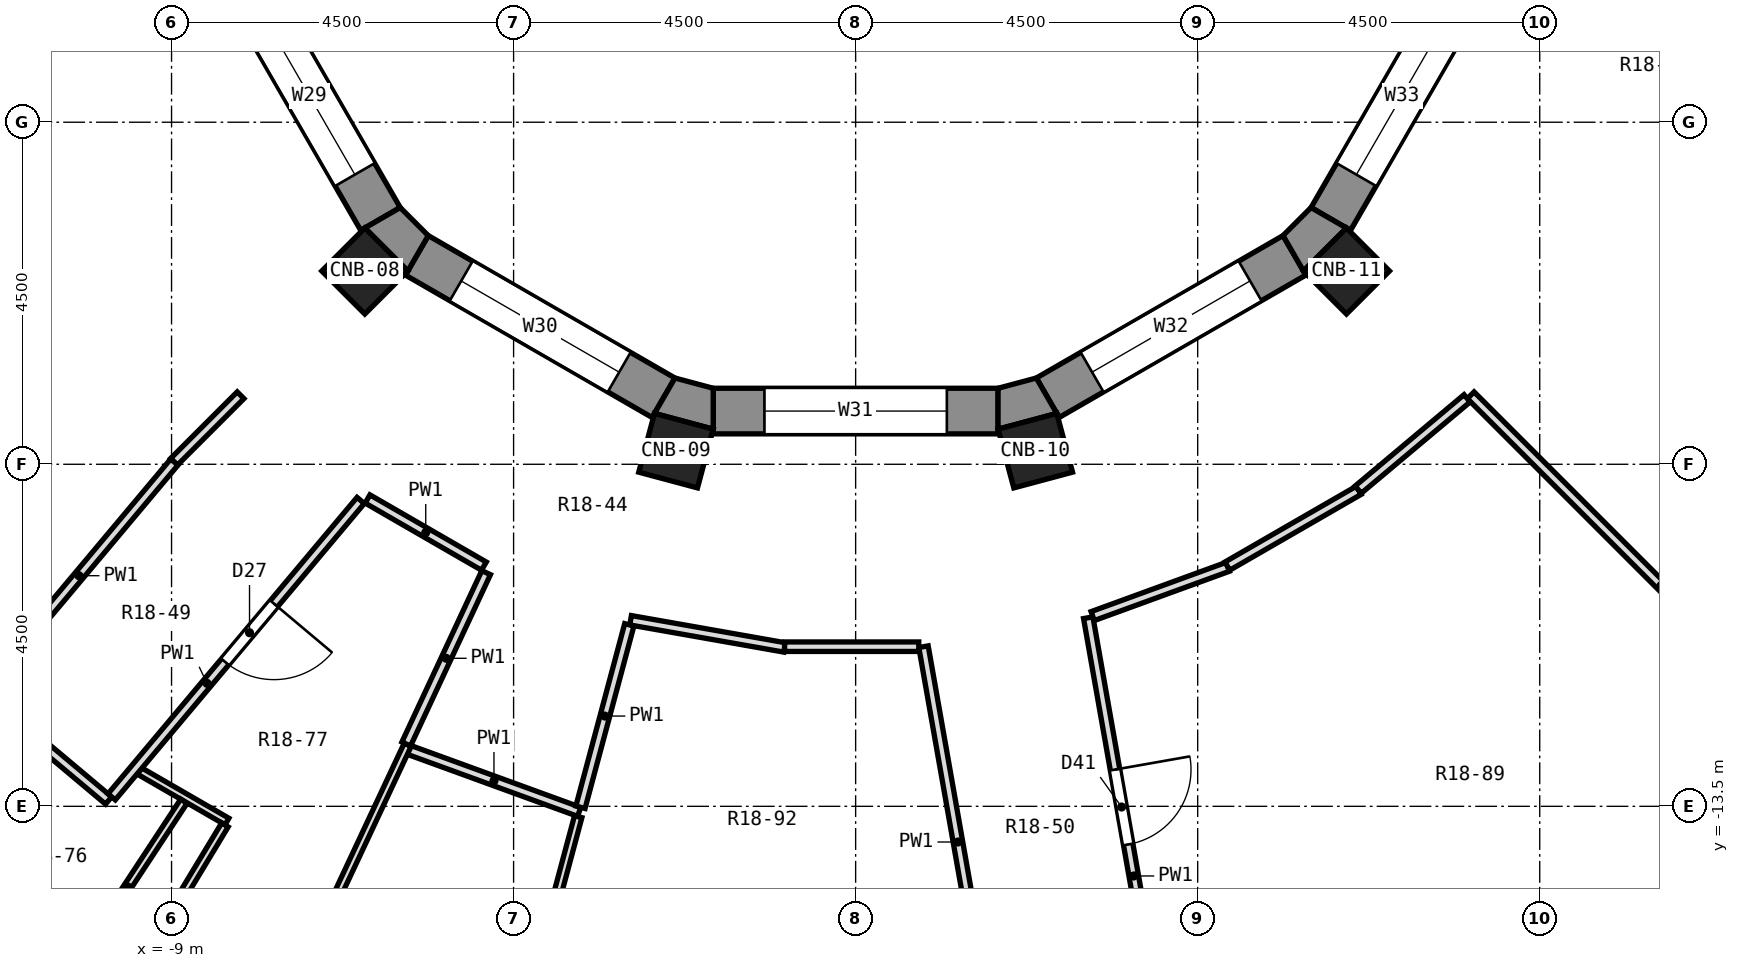
"""IFC4 building model, lengths in metres.
Left out: names, types, materials, properties, quantities, classifications, styles, units other than length and angle.
Written with IfcOpenShell. Run it as: python <this file> out.ifc"""

import sys

from ifc_helpers import new_model, si_unit, direction, frame, frame_2d, origin, origin_2d, place, context, subcontext, project, spatial, polyline, rectangle, outline, extrude, element, fill, save


model = new_model("IFC4")
c1 = context("Model", 3, precision=1e-05, world=origin(), true_north=direction((0.0, 1.0)))
c2 = subcontext(c1, "Body", "Model", "MODEL_VIEW")
j1 = project(units=[si_unit("LENGTHUNIT", "METRE"), si_unit("PLANEANGLEUNIT", "RADIAN")], contexts=[c1])
p1 = place(None, origin())
s1 = spatial("IfcSite", under=j1, at=p1, CompositionType="ELEMENT")
p2 = place(p1, origin())
s2 = spatial("IfcBuilding", under=s1, at=p2, CompositionType="ELEMENT")
p3 = place(p2, frame((0.0, 0.0, 101.8)))
s3 = spatial("IfcBuildingStorey", under=s2, at=p3, CompositionType="ELEMENT", Elevation=101.8)
for number, where, z_axis, x_axis in (
    (1, (-6.458, -6.458, 0.0), (0.0, 0.0, 1.0), (-0.707, -0.707, 0.0)),
    (2, (-2.364, -8.821, 0.0), (0.0, 0.0, 1.0), (-0.259, -0.966, 0.0)),
    (3, (2.364, -8.821, 0.0), (0.0, 0.0, 1.0), (0.259, -0.966, 0.0)),
    (4, (6.458, -6.458, 0.0), (0.0, 0.0, 1.0), (0.707, -0.707, 0.0)),
):
    element("IfcColumn", number, at=place(p3, frame(where, z_axis=z_axis, x_axis=x_axis)), inside=s3, PredefinedType="COLUMN", context=c2, shape_type="SweptSolid", body=[
        extrude(rectangle(XDim=0.8, YDim=0.8, at=origin_2d()), origin(), (0.0, 0.0, 1.0), 3.3),
    ])
p4 = place(p3, frame((-8.125, -2.527, 0.0), z_axis=(0.0, 0.0, 1.0), x_axis=(0.499964958637, -0.86604563398, 0.0)))
e5 = element("IfcWall", 5, at=p4, inside=s3, PredefinedType="SOLIDWALL", context=c2, shape_type="SweptSolid", body=[
    extrude(rectangle(XDim=3.747, YDim=0.6, at=frame_2d((1.874, 0.0))), origin(), (0.0, 0.0, 1.0), 2.8),
])
p5 = place(p4, frame((0.674, 0.0, 0.9)))
e6 = element("IfcOpeningElement", 6, at=p5, cuts=e5, PredefinedType="OPENING", context=c2, shape_type="SweptSolid", body=[
    extrude(rectangle(XDim=2.4, YDim=1.8, at=frame_2d((1.2, 0.9))), frame((0.0, 0.312, 0.0), z_axis=(0.0, -1.0, 0.0), x_axis=(1.0, 0.0, 0.0)), (0.0, 0.0, 1.0), 0.624),
])
p6 = place(p3, frame((-5.773, -6.251, 0.0), z_axis=(0.0, 0.0, 1.0), x_axis=(0.86604563398, -0.499964958637, 0.0)))
e7 = element("IfcWall", 7, at=p6, inside=s3, PredefinedType="SOLIDWALL", context=c2, shape_type="SweptSolid", body=[
    extrude(rectangle(XDim=3.747, YDim=0.6, at=frame_2d((1.874, 0.0))), origin(), (0.0, 0.0, 1.0), 2.8),
])
p7 = place(p6, frame((0.674, 0.0, 0.9)))
e8 = element("IfcOpeningElement", 8, at=p7, cuts=e7, PredefinedType="OPENING", context=c2, shape_type="SweptSolid", body=[
    extrude(rectangle(XDim=2.4, YDim=1.8, at=frame_2d((1.2, 0.9))), frame((0.0, 0.312, 0.0), z_axis=(0.0, -1.0, 0.0), x_axis=(1.0, 0.0, 0.0)), (0.0, 0.0, 1.0), 0.624),
])
p8 = place(p3, frame((-1.874, -8.3, 0.0), z_axis=(0.0, 0.0, 1.0), x_axis=(1.0, 0.0, 0.0)))
e9 = element("IfcWall", 9, at=p8, inside=s3, PredefinedType="SOLIDWALL", context=c2, shape_type="SweptSolid", body=[
    extrude(rectangle(XDim=3.748, YDim=0.6, at=frame_2d((1.874, 0.0))), origin(), (0.0, 0.0, 1.0), 2.8),
])
p9 = place(p8, frame((0.674, 0.0, 0.9)))
e10 = element("IfcOpeningElement", 10, at=p9, cuts=e9, PredefinedType="OPENING", context=c2, shape_type="SweptSolid", body=[
    extrude(rectangle(XDim=2.4, YDim=1.8, at=frame_2d((1.2, 0.9))), frame((0.0, 0.312, 0.0), z_axis=(0.0, -1.0, 0.0), x_axis=(1.0, 0.0, 0.0)), (0.0, 0.0, 1.0), 0.624),
])
p10 = place(p3, frame((2.527, -8.125, 0.0), z_axis=(0.0, 0.0, 1.0), x_axis=(0.86604563398, 0.499964958637, 0.0)))
e11 = element("IfcWall", 11, at=p10, inside=s3, PredefinedType="SOLIDWALL", context=c2, shape_type="SweptSolid", body=[
    extrude(rectangle(XDim=3.747, YDim=0.6, at=frame_2d((1.874, 0.0))), origin(), (0.0, 0.0, 1.0), 2.8),
])
p11 = place(p10, frame((0.674, 0.0, 0.9)))
e12 = element("IfcOpeningElement", 12, at=p11, cuts=e11, PredefinedType="OPENING", context=c2, shape_type="SweptSolid", body=[
    extrude(rectangle(XDim=2.4, YDim=1.8, at=frame_2d((1.2, 0.9))), frame((0.0, 0.312, 0.0), z_axis=(0.0, -1.0, 0.0), x_axis=(1.0, 0.0, 0.0)), (0.0, 0.0, 1.0), 0.624),
])
p12 = place(p3, frame((6.251, -5.773, 0.0), z_axis=(0.0, 0.0, 1.0), x_axis=(0.499964958637, 0.86604563398, 0.0)))
e13 = element("IfcWall", 13, at=p12, inside=s3, PredefinedType="SOLIDWALL", context=c2, shape_type="SweptSolid", body=[
    extrude(rectangle(XDim=3.747, YDim=0.6, at=frame_2d((1.874, 0.0))), origin(), (0.0, 0.0, 1.0), 2.8),
])
p13 = place(p12, frame((0.674, 0.0, 0.9)))
e14 = element("IfcOpeningElement", 14, at=p13, cuts=e13, PredefinedType="OPENING", context=c2, shape_type="SweptSolid", body=[
    extrude(rectangle(XDim=2.4, YDim=1.8, at=frame_2d((1.2, 0.9))), frame((0.0, 0.312, 0.0), z_axis=(0.0, -1.0, 0.0), x_axis=(1.0, 0.0, 0.0)), (0.0, 0.0, 1.0), 0.624),
])
p14 = place(p3, origin())
e15 = element("IfcWall", 15, at=p14, inside=s3, PredefinedType="SOLIDWALL", context=c2, shape_type="SweptSolid", body=[
    extrude(outline(polyline([(-6.458, -5.892), (-5.892, -6.458), (-5.623, -5.991), (-5.991, -5.623), (-6.458, -5.892)])), origin(), (0.0, 0.0, 1.0), 2.8),
])
p15 = place(p3, origin())
e16 = element("IfcWall", 16, at=p15, inside=s3, PredefinedType="SOLIDWALL", context=c2, shape_type="SweptSolid", body=[
    extrude(outline(polyline([(-1.874, -8.538), (-1.874, -8.0), (-2.377, -7.865), (-2.646, -8.331), (-1.874, -8.538)])), origin(), (0.0, 0.0, 1.0), 2.8),
])
p16 = place(p3, origin())
e17 = element("IfcWall", 17, at=p16, inside=s3, PredefinedType="SOLIDWALL", context=c2, shape_type="SweptSolid", body=[
    extrude(outline(polyline([(2.646, -8.331), (2.377, -7.865), (1.874, -8.0), (1.874, -8.538), (2.646, -8.331)])), origin(), (0.0, 0.0, 1.0), 2.8),
])
p17 = place(p3, origin())
e18 = element("IfcWall", 18, at=p17, inside=s3, PredefinedType="SOLIDWALL", context=c2, shape_type="SweptSolid", body=[
    extrude(outline(polyline([(5.892, -6.458), (6.458, -5.892), (5.991, -5.623), (5.623, -5.991), (5.892, -6.458)])), origin(), (0.0, 0.0, 1.0), 2.8),
])
p18 = place(p3, frame((0.893, -11.4, 0.0), z_axis=(0.0, 0.0, 1.0), x_axis=(0.173617189854, -0.984813216497, 0.0)))
e19 = element("IfcWall", 19, at=p18, inside=s3, PredefinedType="PARTITIONING", context=c2, shape_type="SweptSolid", body=[
    extrude(rectangle(XDim=5.219, YDim=0.125, at=frame_2d((2.609, 0.0))), origin(), (0.0, 0.0, 1.0), 2.8),
])
p19 = place(p3, frame((3.06, -11.019, 0.0), z_axis=(0.0, 0.0, 1.0), x_axis=(0.173641190819, -0.984808984956, 0.0)))
e20 = element("IfcWall", 20, at=p19, inside=s3, PredefinedType="PARTITIONING", context=c2, shape_type="SweptSolid", body=[
    extrude(rectangle(XDim=5.218, YDim=0.125, at=frame_2d((2.609, 0.0))), origin(), (0.0, 0.0, 1.0), 2.8),
])
p20 = place(p19, frame((2.029, 0.0, 0.0)))
e21 = element("IfcOpeningElement", 21, at=p20, cuts=e20, PredefinedType="OPENING", context=c2, shape_type="SweptSolid", body=[
    extrude(rectangle(XDim=1.0, YDim=2.1, at=frame_2d((0.5, 1.05))), frame((0.0, 0.074, 0.0), z_axis=(0.0, -1.0, 0.0), x_axis=(1.0, 0.0, 0.0)), (0.0, 0.0, 1.0), 0.149),
])
p21 = place(p3, frame((8.092, -8.092, 0.0), z_axis=(0.0, 0.0, 1.0), x_axis=(0.707106781187, -0.707106781187, 0.0)))
e22 = element("IfcWall", 22, at=p21, inside=s3, PredefinedType="PARTITIONING", context=c2, shape_type="SweptSolid", body=[
    extrude(rectangle(XDim=7.083, YDim=0.125, at=frame_2d((3.541, 0.0))), origin(), (0.0, 0.0, 1.0), 2.8),
])
p22 = place(p3, frame((-12.018, -14.327, 0.0), z_axis=(0.0, 0.0, 1.0), x_axis=(0.76605991383, -0.642769171961, 0.0)))
e23 = element("IfcWall", 23, at=p22, inside=s3, PredefinedType="PARTITIONING", context=c2, shape_type="SweptSolid", body=[
    extrude(rectangle(XDim=2.18, YDim=0.1, at=frame_2d((1.09, 0.0))), origin(), (0.0, 0.0, 1.0), 2.8),
])
p23 = place(p22, frame((0.689, 0.0, 0.0)))
e24 = element("IfcOpeningElement", 24, at=p23, cuts=e23, PredefinedType="OPENING", context=c2, shape_type="SweptSolid", body=[
    extrude(rectangle(XDim=0.8, YDim=2.1, at=frame_2d((0.4, 1.05))), frame((0.0, 0.062, 0.0), z_axis=(0.0, -1.0, 0.0), x_axis=(1.0, 0.0, 0.0)), (0.0, 0.0, 1.0), 0.124),
])
p24 = place(p3, frame((-11.735, -11.823, 0.0), z_axis=(0.0, 0.0, 1.0), x_axis=(0.766013925241, -0.642823977724, 0.0)))
e25 = element("IfcWall", 25, at=p24, inside=s3, PredefinedType="PARTITIONING", context=c2, shape_type="SweptSolid", body=[
    extrude(rectangle(XDim=2.489, YDim=0.125, at=frame_2d((1.245, 0.0))), origin(), (0.0, 0.0, 1.0), 2.8),
])
p25 = place(p3, frame((-9.422, -13.035, 0.0), z_axis=(0.0, 0.0, 1.0), x_axis=(0.866041828806, -0.499971549949, 0.0)))
e26 = element("IfcWall", 26, at=p25, inside=s3, PredefinedType="PARTITIONING", context=c2, shape_type="SweptSolid", body=[
    extrude(rectangle(XDim=1.329, YDim=0.1, at=frame_2d((0.665, 0.0))), origin(), (0.0, 0.0, 1.0), 2.8),
])
p26 = place(p3, frame((-6.421, -9.456, 0.0), z_axis=(0.0, 0.0, 1.0), x_axis=(0.866118896865, -0.499838030259, 0.0)))
e27 = element("IfcWall", 27, at=p26, inside=s3, PredefinedType="PARTITIONING", context=c2, shape_type="SweptSolid", body=[
    extrude(rectangle(XDim=1.768, YDim=0.125, at=frame_2d((0.884, 0.0))), origin(), (0.0, 0.0, 1.0), 2.8),
])
p27 = place(p3, frame((-5.879, -12.756, 0.0), z_axis=(0.0, 0.0, 1.0), x_axis=(0.939637973706, -0.342170247639, 0.0)))
e28 = element("IfcWall", 28, at=p27, inside=s3, PredefinedType="PARTITIONING", context=c2, shape_type="SweptSolid", body=[
    extrude(rectangle(XDim=2.386, YDim=0.125, at=frame_2d((1.193, 0.0))), origin(), (0.0, 0.0, 1.0), 2.8),
])
p28 = place(p3, frame((-2.961, -11.052, 0.0), z_axis=(0.0, 0.0, 1.0), x_axis=(0.984777586027, -0.173819176329, 0.0)))
e29 = element("IfcWall", 29, at=p28, inside=s3, PredefinedType="PARTITIONING", context=c2, shape_type="SweptSolid", body=[
    extrude(rectangle(XDim=2.058, YDim=0.125, at=frame_2d((1.029, 0.0))), origin(), (0.0, 0.0, 1.0), 2.8),
])
p29 = place(p3, frame((-0.935, -11.4, 0.0), z_axis=(0.0, 0.0, 1.0), x_axis=(1.0, 0.0, 0.0)))
e30 = element("IfcWall", 30, at=p29, inside=s3, PredefinedType="PARTITIONING", context=c2, shape_type="SweptSolid", body=[
    extrude(rectangle(XDim=1.765, YDim=0.125, at=frame_2d((0.883, 0.0))), origin(), (0.0, 0.0, 1.0), 2.8),
])
p30 = place(p3, frame((3.119, -10.997, 0.0), z_axis=(0.0, 0.0, 1.0), x_axis=(0.939510386217, 0.342520414269, 0.0)))
e31 = element("IfcWall", 31, at=p30, inside=s3, PredefinedType="PARTITIONING", context=c2, shape_type="SweptSolid", body=[
    extrude(rectangle(XDim=1.891, YDim=0.125, at=frame_2d((0.946, 0.0))), origin(), (0.0, 0.0, 1.0), 2.8),
])
p31 = place(p3, frame((4.89, -10.34, 0.0), z_axis=(0.0, 0.0, 1.0), x_axis=(0.866142818645, 0.499796576329, 0.0)))
e32 = element("IfcWall", 32, at=p31, inside=s3, PredefinedType="PARTITIONING", context=c2, shape_type="SweptSolid", body=[
    extrude(rectangle(XDim=1.996, YDim=0.125, at=frame_2d((0.998, 0.0))), origin(), (0.0, 0.0, 1.0), 2.8),
])
p32 = place(p3, frame((6.612, -9.334, 0.0), z_axis=(0.0, 0.0, 1.0), x_axis=(0.766118936526, 0.642698821453, 0.0)))
e33 = element("IfcWall", 33, at=p32, inside=s3, PredefinedType="PARTITIONING", context=c2, shape_type="SweptSolid", body=[
    extrude(rectangle(XDim=1.869, YDim=0.125, at=frame_2d((0.935, 0.0))), origin(), (0.0, 0.0, 1.0), 2.8),
])
p33 = place(p3, frame((-8.968, -8.968, 0.0), z_axis=(0.0, 0.0, 1.0), x_axis=(0.707106781187, 0.707106781187, 0.0)))
e34 = element("IfcWall", 34, at=p33, inside=s3, PredefinedType="PARTITIONING", context=c2, shape_type="SweptSolid", body=[
    extrude(rectangle(XDim=1.238, YDim=0.125, at=frame_2d((0.619, 0.0))), origin(), (0.0, 0.0, 1.0), 2.8),
])
p34 = place(p3, frame((-9.788, -13.375, 0.0), z_axis=(0.0, 0.0, 1.0), x_axis=(0.643234807085, 0.765668977401, 0.0)))
e35 = element("IfcWall", 35, at=p34, inside=s3, PredefinedType="PARTITIONING", context=c2, shape_type="SweptSolid", body=[
    extrude(rectangle(XDim=5.093, YDim=0.125, at=frame_2d((2.546, 0.0))), origin(), (0.0, 0.0, 1.0), 2.8),
])
p35 = place(p34, frame((2.32, 0.0, 0.0)))
e36 = element("IfcOpeningElement", 36, at=p35, cuts=e35, PredefinedType="OPENING", context=c2, shape_type="SweptSolid", body=[
    extrude(rectangle(XDim=1.0, YDim=2.1, at=frame_2d((0.5, 1.05))), frame((0.0, 0.074, 0.0), z_axis=(0.0, -1.0, 0.0), x_axis=(1.0, 0.0, 0.0)), (0.0, 0.0, 1.0), 0.149),
])
p36 = place(p3, frame((-11.473, -11.961, 0.0), z_axis=(0.0, 0.0, 1.0), x_axis=(0.642813583638, 0.766022647636, 0.0)))
e37 = element("IfcWall", 37, at=p36, inside=s3, PredefinedType="PARTITIONING", context=c2, shape_type="SweptSolid", body=[
    extrude(rectangle(XDim=3.904, YDim=0.125, at=frame_2d((1.952, 0.0))), origin(), (0.0, 0.0, 1.0), 2.8),
])
p37 = place(p3, frame((-10.319, -15.684, 0.0), z_axis=(0.0, 0.0, 1.0), x_axis=(0.549631473795, 0.835407231842, 0.0)))
e38 = element("IfcWall", 38, at=p37, inside=s3, PredefinedType="PARTITIONING", context=c2, shape_type="SweptSolid", body=[
    extrude(rectangle(XDim=2.695, YDim=0.1, at=frame_2d((1.348, 0.0))), origin(), (0.0, 0.0, 1.0), 2.8),
])
p38 = place(p3, frame((-11.287, -18.695, 0.0), z_axis=(0.0, 0.0, 1.0), x_axis=(0.516964841348, 0.856006631288, 0.0)))
e39 = element("IfcWall", 39, at=p38, inside=s3, PredefinedType="PARTITIONING", context=c2, shape_type="SweptSolid", body=[
    extrude(rectangle(XDim=5.782, YDim=0.1, at=frame_2d((2.891, 0.0))), origin(), (0.0, 0.0, 1.0), 2.8),
])
p39 = place(p38, frame((2.035, 0.0, 0.0)))
e40 = element("IfcOpeningElement", 40, at=p39, cuts=e39, PredefinedType="OPENING", context=c2, shape_type="SweptSolid", body=[
    extrude(rectangle(XDim=0.9, YDim=2.1, at=frame_2d((0.45, 1.05))), frame((0.0, 0.062, 0.0), z_axis=(0.0, -1.0, 0.0), x_axis=(1.0, 0.0, 0.0)), (0.0, 0.0, 1.0), 0.124),
])
p40 = place(p3, frame((-10.845, -23.261, 0.0), z_axis=(0.0, 0.0, 1.0), x_axis=(0.424206154739, 0.905565645484, 0.0)))
e41 = element("IfcWall", 41, at=p40, inside=s3, PredefinedType="PARTITIONING", context=c2, shape_type="SweptSolid", body=[
    extrude(rectangle(XDim=11.675, YDim=0.1, at=frame_2d((5.837, 0.0))), origin(), (0.0, 0.0, 1.0), 2.8),
])
p41 = place(p40, frame((7.199, 0.0, 0.0)))
e42 = element("IfcOpeningElement", 42, at=p41, cuts=e41, PredefinedType="OPENING", context=c2, shape_type="SweptSolid", body=[
    extrude(rectangle(XDim=0.9, YDim=2.1, at=frame_2d((0.45, 1.05))), frame((0.0, 0.062, 0.0), z_axis=(0.0, -1.0, 0.0), x_axis=(1.0, 0.0, 0.0)), (0.0, 0.0, 1.0), 0.124),
])
p42 = place(p3, frame((-5.913, -12.68, 0.0), z_axis=(0.0, 0.0, 1.0), x_axis=(0.422627539676, 0.906303460606, 0.0)))
e43 = element("IfcWall", 43, at=p42, inside=s3, PredefinedType="PARTITIONING", context=c2, shape_type="SweptSolid", body=[
    extrude(rectangle(XDim=2.488, YDim=0.125, at=frame_2d((1.244, 0.0))), origin(), (0.0, 0.0, 1.0), 2.8),
])
p43 = place(p3, frame((-6.642, -24.791, 0.0), z_axis=(0.0, 0.0, 1.0), x_axis=(0.259103074619, 0.965849676049, 0.0)))
e44 = element("IfcWall", 44, at=p43, inside=s3, PredefinedType="PARTITIONING", context=c2, shape_type="SweptSolid", body=[
    extrude(rectangle(XDim=11.549, YDim=0.1, at=frame_2d((5.774, 0.0))), origin(), (0.0, 0.0, 1.0), 2.8),
])
p44 = place(p43, frame((7.199, 0.0, 0.0)))
e45 = element("IfcOpeningElement", 45, at=p44, cuts=e44, PredefinedType="OPENING", context=c2, shape_type="SweptSolid", body=[
    extrude(rectangle(XDim=0.9, YDim=2.1, at=frame_2d((0.45, 1.05))), frame((0.0, 0.062, 0.0), z_axis=(0.0, -1.0, 0.0), x_axis=(1.0, 0.0, 0.0)), (0.0, 0.0, 1.0), 0.124),
])
p45 = place(p3, frame((-3.62, -13.512, 0.0), z_axis=(0.0, 0.0, 1.0), x_axis=(0.258641119931, 0.965973483632, 0.0)))
e46 = element("IfcWall", 46, at=p45, inside=s3, PredefinedType="PARTITIONING", context=c2, shape_type="SweptSolid", body=[
    extrude(rectangle(XDim=2.484, YDim=0.125, at=frame_2d((1.242, 0.0))), origin(), (0.0, 0.0, 1.0), 2.8),
])
p46 = place(p5, origin())
e47 = element("IfcWindow", 47, at=p46, inside=s3, PartitioningType="SINGLE_PANEL", PredefinedType="WINDOW", context=c2, shape_type="SweptSolid", body=[
    extrude(rectangle(XDim=2.4, YDim=1.8, at=frame_2d((1.2, 0.9))), frame((0.0, -0.12, 0.0), z_axis=(0.0, -1.0, 0.0), x_axis=(1.0, 0.0, 0.0)), (0.0, 0.0, 1.0), 0.06),
])
fill(e6, e47)
p47 = place(p7, origin())
e48 = element("IfcWindow", 48, at=p47, inside=s3, PartitioningType="SINGLE_PANEL", PredefinedType="WINDOW", context=c2, shape_type="SweptSolid", body=[
    extrude(rectangle(XDim=2.4, YDim=1.8, at=frame_2d((1.2, 0.9))), frame((0.0, -0.12, 0.0), z_axis=(0.0, -1.0, 0.0), x_axis=(1.0, 0.0, 0.0)), (0.0, 0.0, 1.0), 0.06),
])
fill(e8, e48)
p48 = place(p9, origin())
e49 = element("IfcWindow", 49, at=p48, inside=s3, PartitioningType="SINGLE_PANEL", PredefinedType="WINDOW", context=c2, shape_type="SweptSolid", body=[
    extrude(rectangle(XDim=2.4, YDim=1.8, at=frame_2d((1.2, 0.9))), frame((0.0, -0.12, 0.0), z_axis=(0.0, -1.0, 0.0), x_axis=(1.0, 0.0, 0.0)), (0.0, 0.0, 1.0), 0.06),
])
fill(e10, e49)
p49 = place(p11, origin())
e50 = element("IfcWindow", 50, at=p49, inside=s3, PartitioningType="SINGLE_PANEL", PredefinedType="WINDOW", context=c2, shape_type="SweptSolid", body=[
    extrude(rectangle(XDim=2.4, YDim=1.8, at=frame_2d((1.2, 0.9))), frame((0.0, -0.12, 0.0), z_axis=(0.0, -1.0, 0.0), x_axis=(1.0, 0.0, 0.0)), (0.0, 0.0, 1.0), 0.06),
])
fill(e12, e50)
p50 = place(p13, origin())
e51 = element("IfcWindow", 51, at=p50, inside=s3, PartitioningType="SINGLE_PANEL", PredefinedType="WINDOW", context=c2, shape_type="SweptSolid", body=[
    extrude(rectangle(XDim=2.4, YDim=1.8, at=frame_2d((1.2, 0.9))), frame((0.0, -0.12, 0.0), z_axis=(0.0, -1.0, 0.0), x_axis=(1.0, 0.0, 0.0)), (0.0, 0.0, 1.0), 0.06),
])
fill(e14, e51)
p51 = place(p35, frame((1.0, 0.0, 0.0), z_axis=(0.0, 0.0, 1.0), x_axis=(-1.0, 0.0, 0.0)))
e52 = element("IfcDoor", 52, at=p51, inside=s3, OperationType="SINGLE_SWING_LEFT", PredefinedType="DOOR", context=c2, shape_type="SweptSolid", body=[
    extrude(rectangle(XDim=1.0, YDim=2.1, at=frame_2d((0.5, 1.05))), frame((0.0, 0.025, 0.0), z_axis=(0.0, -1.0, 0.0), x_axis=(1.0, 0.0, 0.0)), (0.0, 0.0, 1.0), 0.05),
])
fill(e36, e52)
p52 = place(p20, origin())
e53 = element("IfcDoor", 53, at=p52, inside=s3, OperationType="SINGLE_SWING_LEFT", PredefinedType="DOOR", context=c2, shape_type="SweptSolid", body=[
    extrude(rectangle(XDim=1.0, YDim=2.1, at=frame_2d((0.5, 1.05))), frame((0.0, 0.025, 0.0), z_axis=(0.0, -1.0, 0.0), x_axis=(1.0, 0.0, 0.0)), (0.0, 0.0, 1.0), 0.05),
])
fill(e21, e53)
save(model, sys.argv[1])
